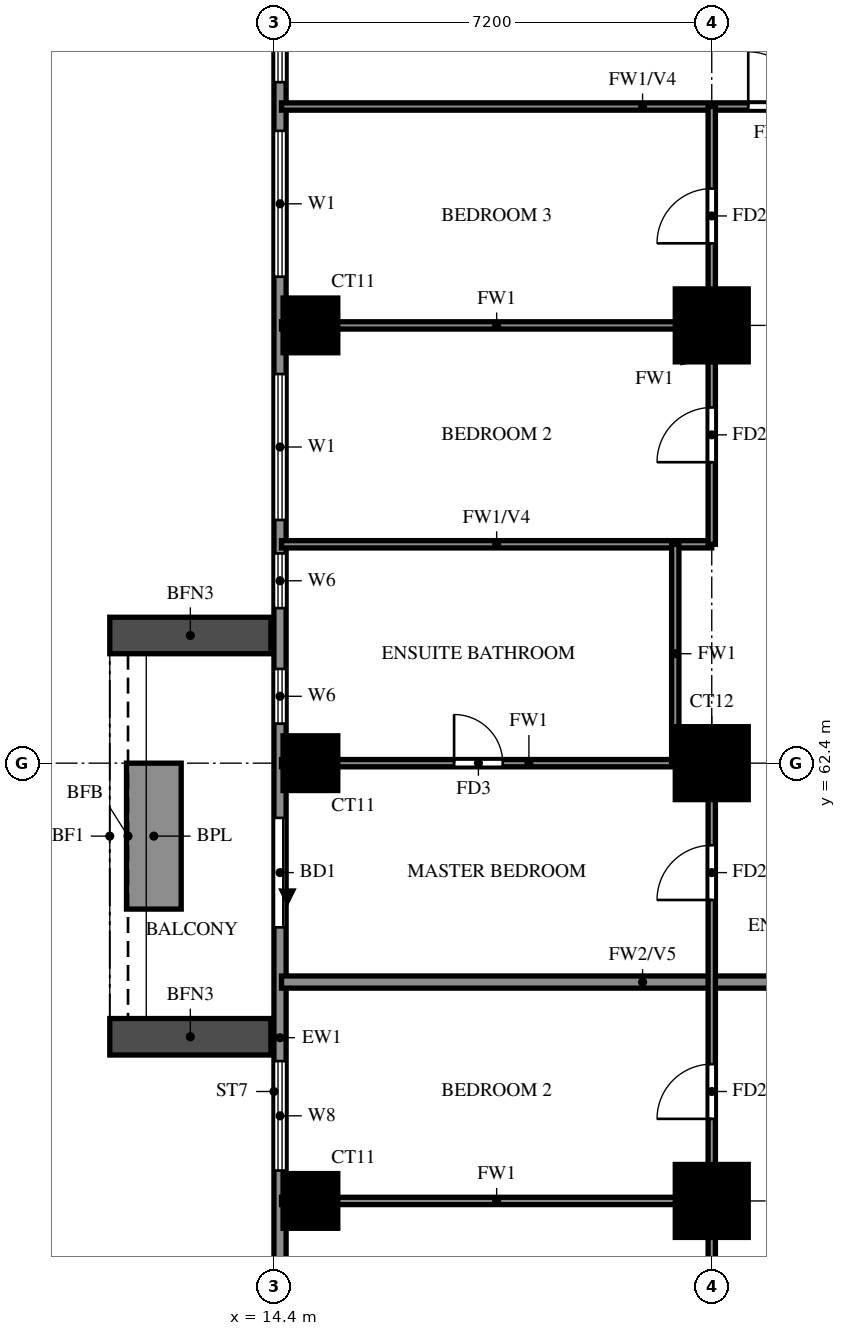
"""IFC4 building model, lengths in metres.
Left out: names, types, materials, properties, quantities, classifications, styles, units other than length and angle.
Written with IfcOpenShell. Run it as: python <this file> out.ifc"""

import sys

from ifc_helpers import new_model, si_unit, direction, frame, frame_2d, origin, origin_2d, place, context, subcontext, project, spatial, rectangle, extrude, source, transform, mapped, element, fill, save


model = new_model("IFC4")
c1 = context("Model", 3, precision=1e-05, world=origin(), true_north=direction((0.0, 1.0)))
c2 = subcontext(c1, "Body", "Model", "MODEL_VIEW")
j1 = project(units=[si_unit("LENGTHUNIT", "METRE"), si_unit("PLANEANGLEUNIT", "RADIAN")], contexts=[c1])
p1 = place(None, origin())
s1 = spatial("IfcSite", under=j1, at=p1, CompositionType="ELEMENT")
p2 = place(p1, origin())
s2 = spatial("IfcBuilding", under=s1, at=p2, CompositionType="ELEMENT")
p3 = place(p2, frame((0.0, 0.0, 93.5)))
s3 = spatial("IfcBuildingStorey", under=s2, at=p3, CompositionType="ELEMENT", Elevation=93.5)
m1 = source(origin(), c2, "Body", "SweptSolid", [
    extrude(rectangle(XDim=0.9, YDim=0.9, at=origin_2d()), origin(), (0.0, 0.0, 1.0), 3.18),
])
p4 = place(p3, frame((15.0, 55.2, 0.0), z_axis=(0.0, 0.0, 1.0), x_axis=(1.0, 0.0, 0.0)))
e1 = element("IfcColumn", 1, at=p4, inside=s3, PredefinedType="COLUMN", context=c2, shape_type="MappedRepresentation", body=[
    mapped(m1, transform((0.0, 0.0, 0.0))),
])
m2 = source(origin(), c2, "Body", "SweptSolid", [
    extrude(rectangle(XDim=1.2, YDim=1.2, at=origin_2d()), origin(), (0.0, 0.0, 1.0), 3.18),
])
p5 = place(p3, frame((21.6, 55.2, 0.0), z_axis=(0.0, 0.0, 1.0), x_axis=(1.0, 0.0, 0.0)))
e2 = element("IfcColumn", 2, at=p5, inside=s3, PredefinedType="COLUMN", context=c2, shape_type="MappedRepresentation", body=[
    mapped(m2, transform((0.0, 0.0, 0.0))),
])
p6 = place(p3, frame((15.0, 62.4, 0.0), z_axis=(0.0, 0.0, 1.0), x_axis=(1.0, 0.0, 0.0)))
e3 = element("IfcColumn", 3, at=p6, inside=s3, PredefinedType="COLUMN", context=c2, shape_type="MappedRepresentation", body=[
    mapped(m1, transform((0.0, 0.0, 0.0))),
])
p7 = place(p3, frame((21.6, 62.4, 0.0), z_axis=(0.0, 0.0, 1.0), x_axis=(1.0, 0.0, 0.0)))
e4 = element("IfcColumn", 4, at=p7, inside=s3, PredefinedType="COLUMN", context=c2, shape_type="MappedRepresentation", body=[
    mapped(m2, transform((0.0, 0.0, 0.0))),
])
p8 = place(p3, frame((15.0, 69.6, 0.0), z_axis=(0.0, 0.0, 1.0), x_axis=(1.0, 0.0, 0.0)))
e5 = element("IfcColumn", 5, at=p8, inside=s3, PredefinedType="COLUMN", context=c2, shape_type="MappedRepresentation", body=[
    mapped(m1, transform((0.0, 0.0, 0.0))),
])
p9 = place(p3, frame((21.6, 69.6, 0.0), z_axis=(0.0, 0.0, 1.0), x_axis=(1.0, 0.0, 0.0)))
e6 = element("IfcColumn", 6, at=p9, inside=s3, PredefinedType="COLUMN", context=c2, shape_type="MappedRepresentation", body=[
    mapped(m2, transform((0.0, 0.0, 0.0))),
])
p10 = place(p3, frame((14.5, 76.6, 0.0), z_axis=(0.0, 0.0, 1.0), x_axis=(0.0, -1.0, 0.0)))
e7 = element("IfcWall", 7, at=p10, inside=s3, PredefinedType="SOLIDWALL", context=c2, shape_type="SweptSolid", body=[
    extrude(rectangle(XDim=39.4, YDim=0.2, at=frame_2d((19.7, 0.0))), origin(), (0.0, 0.0, 1.0), 3.18),
])
p11 = place(p10, frame((15.1, 0.0, 0.0)))
e8 = element("IfcOpeningElement", 8, at=p11, cuts=e7, PredefinedType="OPENING", context=c2, shape_type="SweptSolid", body=[
    extrude(rectangle(XDim=1.8, YDim=2.4, at=frame_2d((0.9, 1.2))), frame((0.0, 0.11, 0.0), z_axis=(0.0, -1.0, 0.0), x_axis=(1.0, 0.0, 0.0)), (0.0, 0.0, 1.0), 0.22),
])
p12 = place(p10, frame((29.5, 0.0, 0.0)))
e9 = element("IfcOpeningElement", 9, at=p12, cuts=e7, PredefinedType="OPENING", context=c2, shape_type="SweptSolid", body=[
    extrude(rectangle(XDim=1.8, YDim=2.4, at=frame_2d((0.9, 1.2))), frame((0.0, 0.11, 0.0), z_axis=(0.0, -1.0, 0.0), x_axis=(1.0, 0.0, 0.0)), (0.0, 0.0, 1.0), 0.22),
])
p13 = place(p10, frame((31.75, 0.0, 0.6)))
e10 = element("IfcOpeningElement", 10, at=p13, cuts=e7, PredefinedType="OPENING", context=c2, shape_type="SweptSolid", body=[
    extrude(rectangle(XDim=0.9, YDim=2.4, at=frame_2d((0.45, 1.2))), frame((0.0, 0.11, 0.0), z_axis=(0.0, -1.0, 0.0), x_axis=(1.0, 0.0, 0.0)), (0.0, 0.0, 1.0), 0.22),
])
p14 = place(p10, frame((33.8, 0.0, 0.6)))
e11 = element("IfcOpeningElement", 11, at=p14, cuts=e7, PredefinedType="OPENING", context=c2, shape_type="SweptSolid", body=[
    extrude(rectangle(XDim=1.2, YDim=2.4, at=frame_2d((0.6, 1.2))), frame((0.0, 0.11, 0.0), z_axis=(0.0, -1.0, 0.0), x_axis=(1.0, 0.0, 0.0)), (0.0, 0.0, 1.0), 0.22),
])
p15 = place(p10, frame((36.8, 0.0, 0.6)))
e12 = element("IfcOpeningElement", 12, at=p15, cuts=e7, PredefinedType="OPENING", context=c2, shape_type="SweptSolid", body=[
    extrude(rectangle(XDim=1.8, YDim=2.4, at=frame_2d((0.9, 1.2))), frame((0.0, 0.11, 0.0), z_axis=(0.0, -1.0, 0.0), x_axis=(1.0, 0.0, 0.0)), (0.0, 0.0, 1.0), 0.22),
])
p16 = place(p10, frame((22.8, 0.0, 0.6)))
e13 = element("IfcOpeningElement", 13, at=p16, cuts=e7, PredefinedType="OPENING", context=c2, shape_type="SweptSolid", body=[
    extrude(rectangle(XDim=2.4, YDim=2.4, at=frame_2d((1.2, 1.2))), frame((0.0, 0.11, 0.0), z_axis=(0.0, -1.0, 0.0), x_axis=(1.0, 0.0, 0.0)), (0.0, 0.0, 1.0), 0.22),
])
p17 = place(p10, frame((27.05, 0.0, 0.6)))
e14 = element("IfcOpeningElement", 14, at=p17, cuts=e7, PredefinedType="OPENING", context=c2, shape_type="SweptSolid", body=[
    extrude(rectangle(XDim=0.9, YDim=2.4, at=frame_2d((0.45, 1.2))), frame((0.0, 0.11, 0.0), z_axis=(0.0, -1.0, 0.0), x_axis=(1.0, 0.0, 0.0)), (0.0, 0.0, 1.0), 0.22),
])
p18 = place(p10, frame((19.1, 0.0, 0.6)))
e15 = element("IfcOpeningElement", 15, at=p18, cuts=e7, PredefinedType="OPENING", context=c2, shape_type="SweptSolid", body=[
    extrude(rectangle(XDim=1.8, YDim=2.4, at=frame_2d((0.9, 1.2))), frame((0.0, 0.11, 0.0), z_axis=(0.0, -1.0, 0.0), x_axis=(1.0, 0.0, 0.0)), (0.0, 0.0, 1.0), 0.22),
])
p19 = place(p10, frame((10.75, 0.0, 1.5)))
e16 = element("IfcOpeningElement", 16, at=p19, cuts=e7, PredefinedType="OPENING", context=c2, shape_type="SweptSolid", body=[
    extrude(rectangle(XDim=0.9, YDim=0.9, at=frame_2d((0.45, 0.45))), frame((0.0, 0.11, 0.0), z_axis=(0.0, -1.0, 0.0), x_axis=(1.0, 0.0, 0.0)), (0.0, 0.0, 1.0), 0.22),
])
p20 = place(p10, frame((12.65, 0.0, 1.5)))
e17 = element("IfcOpeningElement", 17, at=p20, cuts=e7, PredefinedType="OPENING", context=c2, shape_type="SweptSolid", body=[
    extrude(rectangle(XDim=0.9, YDim=0.9, at=frame_2d((0.45, 0.45))), frame((0.0, 0.11, 0.0), z_axis=(0.0, -1.0, 0.0), x_axis=(1.0, 0.0, 0.0)), (0.0, 0.0, 1.0), 0.22),
])
p21 = place(p10, frame((7.8, 0.0, 0.6)))
e18 = element("IfcOpeningElement", 18, at=p21, cuts=e7, PredefinedType="OPENING", context=c2, shape_type="SweptSolid", body=[
    extrude(rectangle(XDim=2.4, YDim=2.4, at=frame_2d((1.2, 1.2))), frame((0.0, 0.11, 0.0), z_axis=(0.0, -1.0, 0.0), x_axis=(1.0, 0.0, 0.0)), (0.0, 0.0, 1.0), 0.22),
])
p22 = place(p10, frame((3.8, 0.0, 0.6)))
e19 = element("IfcOpeningElement", 19, at=p22, cuts=e7, PredefinedType="OPENING", context=c2, shape_type="SweptSolid", body=[
    extrude(rectangle(XDim=2.4, YDim=2.4, at=frame_2d((1.2, 1.2))), frame((0.0, 0.11, 0.0), z_axis=(0.0, -1.0, 0.0), x_axis=(1.0, 0.0, 0.0)), (0.0, 0.0, 1.0), 0.22),
])
p23 = place(p10, frame((0.6, 0.0, 0.6)))
e20 = element("IfcOpeningElement", 20, at=p23, cuts=e7, PredefinedType="OPENING", context=c2, shape_type="SweptSolid", body=[
    extrude(rectangle(XDim=2.4, YDim=2.4, at=frame_2d((1.2, 1.2))), frame((0.0, 0.11, 0.0), z_axis=(0.0, -1.0, 0.0), x_axis=(1.0, 0.0, 0.0)), (0.0, 0.0, 1.0), 0.22),
])
for number, where, z_axis, x_axis in (
    (21, (14.35, 64.5, 0.0), (0.0, 0.0, 1.0), (-1.0, 0.0, 0.0)),
    (22, (14.35, 57.9, 0.0), (0.0, 0.0, 1.0), (-1.0, 0.0, 0.0)),
):
    element("IfcWall", number, at=place(p3, frame(where, z_axis=z_axis, x_axis=x_axis)), inside=s3, PredefinedType="SOLIDWALL", context=c2, shape_type="SweptSolid", body=[
        extrude(rectangle(XDim=2.65, YDim=0.6, at=frame_2d((1.325, 0.0))), origin(), (0.0, 0.0, 1.0), 2.85),
    ])
p24 = place(p3, frame((12.425, 62.4, 0.0), z_axis=(0.0, 0.0, 1.0), x_axis=(0.0, -1.0, 0.0)))
e23 = element("IfcWall", 23, at=p24, inside=s3, PredefinedType="SOLIDWALL", context=c2, shape_type="SweptSolid", body=[
    extrude(rectangle(XDim=2.4, YDim=0.9, at=frame_2d((1.2, 0.0))), origin(), (0.0, 0.0, 1.0), 0.9),
])
p25 = place(p3, frame((14.525, 58.8, 0.0), z_axis=(0.0, 0.0, 1.0), x_axis=(1.0, 0.0, 0.0)))
e24 = element("IfcWall", 24, at=p25, inside=s3, PredefinedType="SOLIDWALL", context=c2, shape_type="SweptSolid", body=[
    extrude(rectangle(XDim=11.875, YDim=0.2, at=frame_2d((5.938, 0.0))), origin(), (0.0, 0.0, 1.0), 2.28),
])
p26 = place(p3, frame((14.525, 55.2, 0.0), z_axis=(0.0, 0.0, 1.0), x_axis=(1.0, 0.0, 0.0)))
e25 = element("IfcWall", 25, at=p26, inside=s3, PredefinedType="PARTITIONING", context=c2, shape_type="SweptSolid", body=[
    extrude(rectangle(XDim=7.075, YDim=0.12, at=frame_2d((3.538, 0.0))), origin(), (0.0, 0.0, 1.0), 3.18),
])
p27 = place(p3, frame((14.525, 62.4, 0.0), z_axis=(0.0, 0.0, 1.0), x_axis=(1.0, 0.0, 0.0)))
e26 = element("IfcWall", 26, at=p27, inside=s3, PredefinedType="PARTITIONING", context=c2, shape_type="SweptSolid", body=[
    extrude(rectangle(XDim=7.075, YDim=0.12, at=frame_2d((3.538, 0.0))), origin(), (0.0, 0.0, 1.0), 3.18),
])
p28 = place(p27, frame((2.837, 0.0, 0.0)))
e27 = element("IfcOpeningElement", 27, at=p28, cuts=e26, PredefinedType="OPENING", context=c2, shape_type="SweptSolid", body=[
    extrude(rectangle(XDim=0.8, YDim=2.1, at=frame_2d((0.4, 1.05))), frame((0.0, 0.07, 0.0), z_axis=(0.0, -1.0, 0.0), x_axis=(1.0, 0.0, 0.0)), (0.0, 0.0, 1.0), 0.14),
])
p29 = place(p3, frame((14.525, 66.0, 0.0), z_axis=(0.0, 0.0, 1.0), x_axis=(1.0, 0.0, 0.0)))
e28 = element("IfcWall", 28, at=p29, inside=s3, PredefinedType="PARTITIONING", context=c2, shape_type="SweptSolid", body=[
    extrude(rectangle(XDim=7.075, YDim=0.12, at=frame_2d((3.538, 0.0))), origin(), (0.0, 0.0, 1.0), 2.28),
])
p30 = place(p3, frame((14.525, 69.6, 0.0), z_axis=(0.0, 0.0, 1.0), x_axis=(1.0, 0.0, 0.0)))
e29 = element("IfcWall", 29, at=p30, inside=s3, PredefinedType="PARTITIONING", context=c2, shape_type="SweptSolid", body=[
    extrude(rectangle(XDim=7.075, YDim=0.12, at=frame_2d((3.538, 0.0))), origin(), (0.0, 0.0, 1.0), 3.18),
])
p31 = place(p3, frame((14.525, 73.2, 0.0), z_axis=(0.0, 0.0, 1.0), x_axis=(1.0, 0.0, 0.0)))
e30 = element("IfcWall", 30, at=p31, inside=s3, PredefinedType="PARTITIONING", context=c2, shape_type="SweptSolid", body=[
    extrude(rectangle(XDim=11.875, YDim=0.12, at=frame_2d((5.938, 0.0))), origin(), (0.0, 0.0, 1.0), 2.28),
])
p32 = place(p31, frame((7.675, 0.0, 0.0)))
e31 = element("IfcOpeningElement", 31, at=p32, cuts=e30, PredefinedType="OPENING", context=c2, shape_type="SweptSolid", body=[
    extrude(rectangle(XDim=0.9, YDim=2.1, at=frame_2d((0.45, 1.05))), frame((0.0, 0.07, 0.0), z_axis=(0.0, -1.0, 0.0), x_axis=(1.0, 0.0, 0.0)), (0.0, 0.0, 1.0), 0.14),
])
p33 = place(p3, frame((21.0, 62.4, 0.0), z_axis=(0.0, 0.0, 1.0), x_axis=(0.0, 1.0, 0.0)))
e32 = element("IfcWall", 32, at=p33, inside=s3, PredefinedType="PARTITIONING", context=c2, shape_type="SweptSolid", body=[
    extrude(rectangle(XDim=3.6, YDim=0.12, at=frame_2d((1.8, 0.0))), origin(), (0.0, 0.0, 1.0), 3.18),
])
p34 = place(p3, frame((21.6, 33.725, 0.0), z_axis=(0.0, 0.0, 1.0), x_axis=(0.0, 1.0, 0.0)))
e33 = element("IfcWall", 33, at=p34, inside=s3, PredefinedType="PARTITIONING", context=c2, shape_type="SweptSolid", body=[
    extrude(rectangle(XDim=28.675, YDim=0.12, at=frame_2d((14.337, 0.0))), origin(), (0.0, 0.0, 1.0), 3.18),
])
p35 = place(p34, frame((7.775, 0.0, 0.0)))
e34 = element("IfcOpeningElement", 34, at=p35, cuts=e33, PredefinedType="OPENING", context=c2, shape_type="SweptSolid", body=[
    extrude(rectangle(XDim=0.9, YDim=2.1, at=frame_2d((0.45, 1.05))), frame((0.0, 0.07, 0.0), z_axis=(0.0, -1.0, 0.0), x_axis=(1.0, 0.0, 0.0)), (0.0, 0.0, 1.0), 0.14),
])
p36 = place(p34, frame((17.125, 0.0, 0.0)))
e35 = element("IfcOpeningElement", 35, at=p36, cuts=e33, PredefinedType="OPENING", context=c2, shape_type="SweptSolid", body=[
    extrude(rectangle(XDim=1.5, YDim=2.1, at=frame_2d((0.75, 1.05))), frame((0.0, 0.07, 0.0), z_axis=(0.0, -1.0, 0.0), x_axis=(1.0, 0.0, 0.0)), (0.0, 0.0, 1.0), 0.14),
])
p37 = place(p34, frame((22.825, 0.0, 0.0)))
e36 = element("IfcOpeningElement", 36, at=p37, cuts=e33, PredefinedType="OPENING", context=c2, shape_type="SweptSolid", body=[
    extrude(rectangle(XDim=0.9, YDim=2.1, at=frame_2d((0.45, 1.05))), frame((0.0, 0.07, 0.0), z_axis=(0.0, -1.0, 0.0), x_axis=(1.0, 0.0, 0.0)), (0.0, 0.0, 1.0), 0.14),
])
p38 = place(p34, frame((26.425, 0.0, 0.0)))
e37 = element("IfcOpeningElement", 37, at=p38, cuts=e33, PredefinedType="OPENING", context=c2, shape_type="SweptSolid", body=[
    extrude(rectangle(XDim=0.9, YDim=2.1, at=frame_2d((0.45, 1.05))), frame((0.0, 0.07, 0.0), z_axis=(0.0, -1.0, 0.0), x_axis=(1.0, 0.0, 0.0)), (0.0, 0.0, 1.0), 0.14),
])
p39 = place(p3, frame((21.6, 66.0, 0.0), z_axis=(0.0, 0.0, 1.0), x_axis=(0.0, 1.0, 0.0)))
e38 = element("IfcWall", 38, at=p39, inside=s3, PredefinedType="PARTITIONING", context=c2, shape_type="SweptSolid", body=[
    extrude(rectangle(XDim=7.2, YDim=0.12, at=frame_2d((3.6, 0.0))), origin(), (0.0, 0.0, 1.0), 3.18),
])
p40 = place(p39, frame((1.35, 0.0, 0.0)))
e39 = element("IfcOpeningElement", 39, at=p40, cuts=e38, PredefinedType="OPENING", context=c2, shape_type="SweptSolid", body=[
    extrude(rectangle(XDim=0.9, YDim=2.1, at=frame_2d((0.45, 1.05))), frame((0.0, 0.07, 0.0), z_axis=(0.0, -1.0, 0.0), x_axis=(1.0, 0.0, 0.0)), (0.0, 0.0, 1.0), 0.14),
])
p41 = place(p39, frame((4.95, 0.0, 0.0)))
e40 = element("IfcOpeningElement", 40, at=p41, cuts=e38, PredefinedType="OPENING", context=c2, shape_type="SweptSolid", body=[
    extrude(rectangle(XDim=0.9, YDim=2.1, at=frame_2d((0.45, 1.05))), frame((0.0, 0.07, 0.0), z_axis=(0.0, -1.0, 0.0), x_axis=(1.0, 0.0, 0.0)), (0.0, 0.0, 1.0), 0.14),
])
p42 = place(p11, origin())
e41 = element("IfcDoor", 41, at=p42, inside=s3, OperationType="DOUBLE_DOOR_SLIDING", PredefinedType="DOOR", context=c2, shape_type="SweptSolid", body=[
    extrude(rectangle(XDim=1.8, YDim=2.4, at=frame_2d((0.9, 1.2))), frame((0.0, 0.025, 0.0), z_axis=(0.0, -1.0, 0.0), x_axis=(1.0, 0.0, 0.0)), (0.0, 0.0, 1.0), 0.05),
])
fill(e8, e41)
p43 = place(p18, origin())
e42 = element("IfcWindow", 42, at=p43, inside=s3, PartitioningType="DOUBLE_PANEL_VERTICAL", PredefinedType="WINDOW", context=c2, shape_type="SweptSolid", body=[
    extrude(rectangle(XDim=1.8, YDim=2.4, at=frame_2d((0.9, 1.2))), frame((0.0, 0.03, 0.0), z_axis=(0.0, -1.0, 0.0), x_axis=(1.0, 0.0, 0.0)), (0.0, 0.0, 1.0), 0.06),
])
fill(e15, e42)
p44 = place(p19, origin())
e43 = element("IfcWindow", 43, at=p44, inside=s3, PartitioningType="SINGLE_PANEL", PredefinedType="WINDOW", context=c2, shape_type="SweptSolid", body=[
    extrude(rectangle(XDim=0.9, YDim=0.9, at=frame_2d((0.45, 0.45))), frame((0.0, 0.03, 0.0), z_axis=(0.0, -1.0, 0.0), x_axis=(1.0, 0.0, 0.0)), (0.0, 0.0, 1.0), 0.06),
])
fill(e16, e43)
p45 = place(p20, origin())
e44 = element("IfcWindow", 44, at=p45, inside=s3, PartitioningType="SINGLE_PANEL", PredefinedType="WINDOW", context=c2, shape_type="SweptSolid", body=[
    extrude(rectangle(XDim=0.9, YDim=0.9, at=frame_2d((0.45, 0.45))), frame((0.0, 0.03, 0.0), z_axis=(0.0, -1.0, 0.0), x_axis=(1.0, 0.0, 0.0)), (0.0, 0.0, 1.0), 0.06),
])
fill(e17, e44)
p46 = place(p21, origin())
e45 = element("IfcWindow", 45, at=p46, inside=s3, PartitioningType="DOUBLE_PANEL_VERTICAL", PredefinedType="WINDOW", context=c2, shape_type="SweptSolid", body=[
    extrude(rectangle(XDim=2.4, YDim=2.4, at=frame_2d((1.2, 1.2))), frame((0.0, 0.03, 0.0), z_axis=(0.0, -1.0, 0.0), x_axis=(1.0, 0.0, 0.0)), (0.0, 0.0, 1.0), 0.06),
])
fill(e18, e45)
p47 = place(p22, origin())
e46 = element("IfcWindow", 46, at=p47, inside=s3, PartitioningType="DOUBLE_PANEL_VERTICAL", PredefinedType="WINDOW", context=c2, shape_type="SweptSolid", body=[
    extrude(rectangle(XDim=2.4, YDim=2.4, at=frame_2d((1.2, 1.2))), frame((0.0, 0.03, 0.0), z_axis=(0.0, -1.0, 0.0), x_axis=(1.0, 0.0, 0.0)), (0.0, 0.0, 1.0), 0.06),
])
fill(e19, e46)
p48 = place(p23, origin())
e47 = element("IfcWindow", 47, at=p48, inside=s3, PartitioningType="DOUBLE_PANEL_VERTICAL", PredefinedType="WINDOW", context=c2, shape_type="SweptSolid", body=[
    extrude(rectangle(XDim=2.4, YDim=2.4, at=frame_2d((1.2, 1.2))), frame((0.0, 0.03, 0.0), z_axis=(0.0, -1.0, 0.0), x_axis=(1.0, 0.0, 0.0)), (0.0, 0.0, 1.0), 0.06),
])
fill(e20, e47)
p49 = place(p37, origin())
e48 = element("IfcDoor", 48, at=p49, inside=s3, OperationType="SINGLE_SWING_RIGHT", PredefinedType="DOOR", context=c2, shape_type="SweptSolid", body=[
    extrude(rectangle(XDim=0.9, YDim=2.1, at=frame_2d((0.45, 1.05))), frame((0.0, 0.025, 0.0), z_axis=(0.0, -1.0, 0.0), x_axis=(1.0, 0.0, 0.0)), (0.0, 0.0, 1.0), 0.05),
])
fill(e36, e48)
p50 = place(p38, origin())
e49 = element("IfcDoor", 49, at=p50, inside=s3, OperationType="SINGLE_SWING_LEFT", PredefinedType="DOOR", context=c2, shape_type="SweptSolid", body=[
    extrude(rectangle(XDim=0.9, YDim=2.1, at=frame_2d((0.45, 1.05))), frame((0.0, 0.025, 0.0), z_axis=(0.0, -1.0, 0.0), x_axis=(1.0, 0.0, 0.0)), (0.0, 0.0, 1.0), 0.05),
])
fill(e37, e49)
p51 = place(p28, origin())
e50 = element("IfcDoor", 50, at=p51, inside=s3, OperationType="SINGLE_SWING_RIGHT", PredefinedType="DOOR", context=c2, shape_type="SweptSolid", body=[
    extrude(rectangle(XDim=0.8, YDim=2.1, at=frame_2d((0.4, 1.05))), frame((0.0, 0.025, 0.0), z_axis=(0.0, -1.0, 0.0), x_axis=(1.0, 0.0, 0.0)), (0.0, 0.0, 1.0), 0.05),
])
fill(e27, e50)
p52 = place(p40, origin())
e51 = element("IfcDoor", 51, at=p52, inside=s3, OperationType="SINGLE_SWING_LEFT", PredefinedType="DOOR", context=c2, shape_type="SweptSolid", body=[
    extrude(rectangle(XDim=0.9, YDim=2.1, at=frame_2d((0.45, 1.05))), frame((0.0, 0.025, 0.0), z_axis=(0.0, -1.0, 0.0), x_axis=(1.0, 0.0, 0.0)), (0.0, 0.0, 1.0), 0.05),
])
fill(e39, e51)
p53 = place(p41, origin())
e52 = element("IfcDoor", 52, at=p53, inside=s3, OperationType="SINGLE_SWING_LEFT", PredefinedType="DOOR", context=c2, shape_type="SweptSolid", body=[
    extrude(rectangle(XDim=0.9, YDim=2.1, at=frame_2d((0.45, 1.05))), frame((0.0, 0.025, 0.0), z_axis=(0.0, -1.0, 0.0), x_axis=(1.0, 0.0, 0.0)), (0.0, 0.0, 1.0), 0.05),
])
fill(e40, e52)
p54 = place(p32, origin())
e53 = element("IfcDoor", 53, at=p54, inside=s3, OperationType="SINGLE_SWING_RIGHT", PredefinedType="DOOR", context=c2, shape_type="SweptSolid", body=[
    extrude(rectangle(XDim=0.9, YDim=2.1, at=frame_2d((0.45, 1.05))), frame((0.0, 0.025, 0.0), z_axis=(0.0, -1.0, 0.0), x_axis=(1.0, 0.0, 0.0)), (0.0, 0.0, 1.0), 0.05),
])
fill(e31, e53)
save(model, sys.argv[1])
